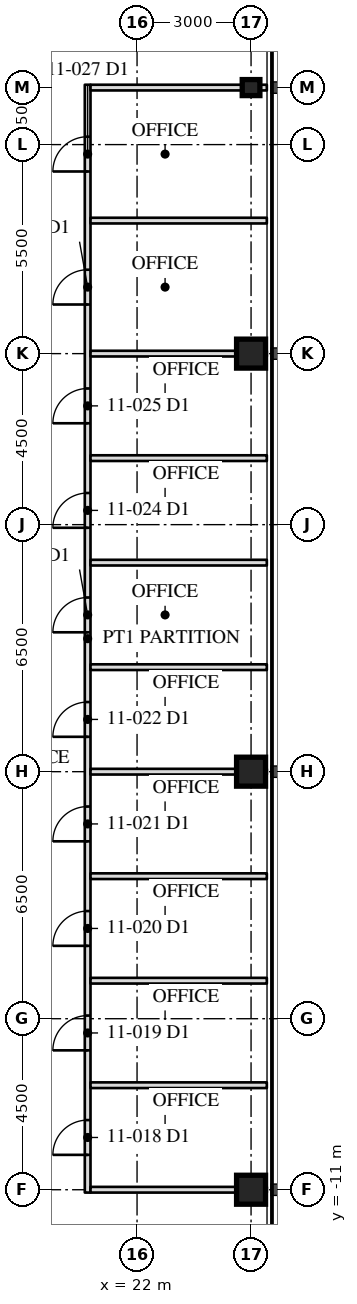
"""IFC4 building model, lengths in metres.
Left out: names, types, materials, properties, quantities, classifications, styles, units other than length and angle.
Written with IfcOpenShell. Run it as: python <this file> out.ifc"""

import sys

from ifc_helpers import new_model, si_unit, direction, frame, frame_2d, origin, origin_2d, place, context, subcontext, project, spatial, rectangle, hollow_rectangle, i_section, extrude, element, fill, save


model = new_model("IFC4")
c1 = context("Model", 3, precision=1e-05, world=origin(), true_north=direction((0.0, 1.0)))
c2 = subcontext(c1, "Body", "Model", "MODEL_VIEW")
j1 = project(units=[si_unit("LENGTHUNIT", "METRE"), si_unit("PLANEANGLEUNIT", "RADIAN")], contexts=[c1])
p1 = place(None, origin())
s1 = spatial("IfcSite", under=j1, at=p1, CompositionType="ELEMENT")
p2 = place(p1, origin())
s2 = spatial("IfcBuilding", under=s1, at=p2, CompositionType="ELEMENT")
p3 = place(p2, frame((0.0, 0.0, 48.8)))
s3 = spatial("IfcBuildingStorey", under=s2, at=p3, CompositionType="ELEMENT", Elevation=48.8)
for number, where, z_axis, x_axis in (
    (1, (25.0, -11.0, 0.0), (0.0, 0.0, 1.0), (0.0, 1.0, 0.0)),
    (2, (25.0, 0.0, 0.0), (0.0, 0.0, 1.0), (0.0, 1.0, 0.0)),
    (3, (25.0, 11.0, 0.0), (0.0, 0.0, 1.0), (0.0, 1.0, 0.0)),
):
    element("IfcColumn", number, at=place(p3, frame(where, z_axis=z_axis, x_axis=x_axis)), inside=s3, PredefinedType="COLUMN", context=c2, shape_type="SweptSolid", body=[
        extrude(hollow_rectangle(XDim=0.762, YDim=0.762, WallThickness=0.127, at=origin_2d()), origin(), (0.0, 0.0, 1.0), 4.1),
    ])
p4 = place(p3, frame((25.0, 18.0, 0.0), z_axis=(0.0, 0.0, 1.0), x_axis=(0.0, 1.0, 0.0)))
e4 = element("IfcColumn", 4, at=p4, inside=s3, PredefinedType="COLUMN", context=c2, shape_type="SweptSolid", body=[
    extrude(i_section(OverallWidth=0.422, OverallDepth=0.465, WebThickness=0.045, FlangeThickness=0.073, at=origin_2d()), origin(), (0.0, 0.0, 1.0), 4.1),
])
p5 = place(p3, frame((20.7, -11.075, 0.0), z_axis=(0.0, 0.0, 1.0), x_axis=(0.0, 1.0, 0.0)))
e5 = element("IfcWall", 5, at=p5, inside=s3, PredefinedType="PARTITIONING", context=c2, shape_type="SweptSolid", body=[
    extrude(rectangle(XDim=29.15, YDim=0.15, at=frame_2d((14.575, 0.0))), origin(), (0.0, 0.0, 1.0), 3.91),
])
p6 = place(p5, frame((0.992, 0.0, 0.0)))
e6 = element("IfcOpeningElement", 6, at=p6, cuts=e5, PredefinedType="OPENING", context=c2, shape_type="SweptSolid", body=[
    extrude(rectangle(XDim=0.915, YDim=2.134, at=frame_2d((0.458, 1.067))), frame((0.0, 0.085, 0.0), z_axis=(0.0, -1.0, 0.0), x_axis=(1.0, 0.0, 0.0)), (0.0, 0.0, 1.0), 0.17),
])
p7 = place(p5, frame((3.742, 0.0, 0.0)))
e7 = element("IfcOpeningElement", 7, at=p7, cuts=e5, PredefinedType="OPENING", context=c2, shape_type="SweptSolid", body=[
    extrude(rectangle(XDim=0.915, YDim=2.134, at=frame_2d((0.458, 1.067))), frame((0.0, 0.085, 0.0), z_axis=(0.0, -1.0, 0.0), x_axis=(1.0, 0.0, 0.0)), (0.0, 0.0, 1.0), 0.17),
])
p8 = place(p5, frame((6.492, 0.0, 0.0)))
e8 = element("IfcOpeningElement", 8, at=p8, cuts=e5, PredefinedType="OPENING", context=c2, shape_type="SweptSolid", body=[
    extrude(rectangle(XDim=0.915, YDim=2.134, at=frame_2d((0.458, 1.067))), frame((0.0, 0.085, 0.0), z_axis=(0.0, -1.0, 0.0), x_axis=(1.0, 0.0, 0.0)), (0.0, 0.0, 1.0), 0.17),
])
p9 = place(p5, frame((9.242, 0.0, 0.0)))
e9 = element("IfcOpeningElement", 9, at=p9, cuts=e5, PredefinedType="OPENING", context=c2, shape_type="SweptSolid", body=[
    extrude(rectangle(XDim=0.915, YDim=2.134, at=frame_2d((0.458, 1.067))), frame((0.0, 0.085, 0.0), z_axis=(0.0, -1.0, 0.0), x_axis=(1.0, 0.0, 0.0)), (0.0, 0.0, 1.0), 0.17),
])
p10 = place(p5, frame((11.992, 0.0, 0.0)))
e10 = element("IfcOpeningElement", 10, at=p10, cuts=e5, PredefinedType="OPENING", context=c2, shape_type="SweptSolid", body=[
    extrude(rectangle(XDim=0.915, YDim=2.134, at=frame_2d((0.458, 1.067))), frame((0.0, 0.085, 0.0), z_axis=(0.0, -1.0, 0.0), x_axis=(1.0, 0.0, 0.0)), (0.0, 0.0, 1.0), 0.17),
])
p11 = place(p5, frame((14.742, 0.0, 0.0)))
e11 = element("IfcOpeningElement", 11, at=p11, cuts=e5, PredefinedType="OPENING", context=c2, shape_type="SweptSolid", body=[
    extrude(rectangle(XDim=0.915, YDim=2.134, at=frame_2d((0.458, 1.067))), frame((0.0, 0.085, 0.0), z_axis=(0.0, -1.0, 0.0), x_axis=(1.0, 0.0, 0.0)), (0.0, 0.0, 1.0), 0.17),
])
p12 = place(p5, frame((17.492, 0.0, 0.0)))
e12 = element("IfcOpeningElement", 12, at=p12, cuts=e5, PredefinedType="OPENING", context=c2, shape_type="SweptSolid", body=[
    extrude(rectangle(XDim=0.915, YDim=2.134, at=frame_2d((0.458, 1.067))), frame((0.0, 0.085, 0.0), z_axis=(0.0, -1.0, 0.0), x_axis=(1.0, 0.0, 0.0)), (0.0, 0.0, 1.0), 0.17),
])
p13 = place(p5, frame((20.242, 0.0, 0.0)))
e13 = element("IfcOpeningElement", 13, at=p13, cuts=e5, PredefinedType="OPENING", context=c2, shape_type="SweptSolid", body=[
    extrude(rectangle(XDim=0.915, YDim=2.134, at=frame_2d((0.458, 1.067))), frame((0.0, 0.085, 0.0), z_axis=(0.0, -1.0, 0.0), x_axis=(1.0, 0.0, 0.0)), (0.0, 0.0, 1.0), 0.17),
])
p14 = place(p5, frame((23.367, 0.0, 0.0)))
e14 = element("IfcOpeningElement", 14, at=p14, cuts=e5, PredefinedType="OPENING", context=c2, shape_type="SweptSolid", body=[
    extrude(rectangle(XDim=0.915, YDim=2.134, at=frame_2d((0.458, 1.067))), frame((0.0, 0.085, 0.0), z_axis=(0.0, -1.0, 0.0), x_axis=(1.0, 0.0, 0.0)), (0.0, 0.0, 1.0), 0.17),
])
p15 = place(p5, frame((26.867, 0.0, 0.0)))
e15 = element("IfcOpeningElement", 15, at=p15, cuts=e5, PredefinedType="OPENING", context=c2, shape_type="SweptSolid", body=[
    extrude(rectangle(XDim=0.915, YDim=2.134, at=frame_2d((0.458, 1.067))), frame((0.0, 0.085, 0.0), z_axis=(0.0, -1.0, 0.0), x_axis=(1.0, 0.0, 0.0)), (0.0, 0.0, 1.0), 0.17),
])
p16 = place(p3, frame((20.775, -11.0, 0.0), z_axis=(0.0, 0.0, 1.0), x_axis=(1.0, 0.0, 0.0)))
e16 = element("IfcWall", 16, at=p16, inside=s3, PredefinedType="PARTITIONING", context=c2, shape_type="SweptSolid", body=[
    extrude(rectangle(XDim=4.64, YDim=0.15, at=frame_2d((2.32, 0.0))), origin(), (0.0, 0.0, 1.0), 3.13),
])
for number, where, z_axis, x_axis in (
    (17, (20.775, -8.25, 0.0), (0.0, 0.0, 1.0), (1.0, 0.0, 0.0)),
    (18, (20.775, -5.5, 0.0), (0.0, 0.0, 1.0), (1.0, 0.0, 0.0)),
    (19, (20.775, -2.75, 0.0), (0.0, 0.0, 1.0), (1.0, 0.0, 0.0)),
):
    element("IfcWall", number, at=place(p3, frame(where, z_axis=z_axis, x_axis=x_axis)), inside=s3, PredefinedType="PARTITIONING", context=c2, shape_type="SweptSolid", body=[
        extrude(rectangle(XDim=4.64, YDim=0.15, at=frame_2d((2.32, 0.0))), origin(), (0.0, 0.0, 1.0), 3.91),
    ])
p17 = place(p3, frame((20.775, 0.0, 0.0), z_axis=(0.0, 0.0, 1.0), x_axis=(1.0, 0.0, 0.0)))
e20 = element("IfcWall", 20, at=p17, inside=s3, PredefinedType="PARTITIONING", context=c2, shape_type="SweptSolid", body=[
    extrude(rectangle(XDim=4.64, YDim=0.15, at=frame_2d((2.32, 0.0))), origin(), (0.0, 0.0, 1.0), 3.13),
])
for number, where, z_axis, x_axis in (
    (21, (20.775, 2.75, 0.0), (0.0, 0.0, 1.0), (1.0, 0.0, 0.0)),
    (22, (20.775, 5.5, 0.0), (0.0, 0.0, 1.0), (1.0, 0.0, 0.0)),
    (23, (20.775, 8.25, 0.0), (0.0, 0.0, 1.0), (1.0, 0.0, 0.0)),
):
    element("IfcWall", number, at=place(p3, frame(where, z_axis=z_axis, x_axis=x_axis)), inside=s3, PredefinedType="PARTITIONING", context=c2, shape_type="SweptSolid", body=[
        extrude(rectangle(XDim=4.64, YDim=0.15, at=frame_2d((2.32, 0.0))), origin(), (0.0, 0.0, 1.0), 3.91),
    ])
p18 = place(p3, frame((20.775, 11.0, 0.0), z_axis=(0.0, 0.0, 1.0), x_axis=(1.0, 0.0, 0.0)))
e24 = element("IfcWall", 24, at=p18, inside=s3, PredefinedType="PARTITIONING", context=c2, shape_type="SweptSolid", body=[
    extrude(rectangle(XDim=4.64, YDim=0.15, at=frame_2d((2.32, 0.0))), origin(), (0.0, 0.0, 1.0), 3.13),
])
for number, where, z_axis, x_axis in (
    (25, (20.775, 14.5, 0.0), (0.0, 0.0, 1.0), (1.0, 0.0, 0.0)),
    (26, (20.775, 18.0, 0.0), (0.0, 0.0, 1.0), (1.0, 0.0, 0.0)),
):
    element("IfcWall", number, at=place(p3, frame(where, z_axis=z_axis, x_axis=x_axis)), inside=s3, PredefinedType="PARTITIONING", context=c2, shape_type="SweptSolid", body=[
        extrude(rectangle(XDim=4.64, YDim=0.15, at=frame_2d((2.32, 0.0))), origin(), (0.0, 0.0, 1.0), 3.91),
    ])
p19 = place(p6, origin())
e27 = element("IfcDoor", 27, at=p19, inside=s3, OperationType="SINGLE_SWING_LEFT", PredefinedType="DOOR", context=c2, shape_type="SweptSolid", body=[
    extrude(rectangle(XDim=0.915, YDim=2.134, at=frame_2d((0.458, 1.067))), frame((0.0, 0.025, 0.0), z_axis=(0.0, -1.0, 0.0), x_axis=(1.0, 0.0, 0.0)), (0.0, 0.0, 1.0), 0.05),
])
fill(e6, e27)
p20 = place(p7, origin())
e28 = element("IfcDoor", 28, at=p20, inside=s3, OperationType="SINGLE_SWING_LEFT", PredefinedType="DOOR", context=c2, shape_type="SweptSolid", body=[
    extrude(rectangle(XDim=0.915, YDim=2.134, at=frame_2d((0.458, 1.067))), frame((0.0, 0.025, 0.0), z_axis=(0.0, -1.0, 0.0), x_axis=(1.0, 0.0, 0.0)), (0.0, 0.0, 1.0), 0.05),
])
fill(e7, e28)
p21 = place(p8, origin())
e29 = element("IfcDoor", 29, at=p21, inside=s3, OperationType="SINGLE_SWING_LEFT", PredefinedType="DOOR", context=c2, shape_type="SweptSolid", body=[
    extrude(rectangle(XDim=0.915, YDim=2.134, at=frame_2d((0.458, 1.067))), frame((0.0, 0.025, 0.0), z_axis=(0.0, -1.0, 0.0), x_axis=(1.0, 0.0, 0.0)), (0.0, 0.0, 1.0), 0.05),
])
fill(e8, e29)
p22 = place(p9, origin())
e30 = element("IfcDoor", 30, at=p22, inside=s3, OperationType="SINGLE_SWING_LEFT", PredefinedType="DOOR", context=c2, shape_type="SweptSolid", body=[
    extrude(rectangle(XDim=0.915, YDim=2.134, at=frame_2d((0.458, 1.067))), frame((0.0, 0.025, 0.0), z_axis=(0.0, -1.0, 0.0), x_axis=(1.0, 0.0, 0.0)), (0.0, 0.0, 1.0), 0.05),
])
fill(e9, e30)
p23 = place(p10, origin())
e31 = element("IfcDoor", 31, at=p23, inside=s3, OperationType="SINGLE_SWING_LEFT", PredefinedType="DOOR", context=c2, shape_type="SweptSolid", body=[
    extrude(rectangle(XDim=0.915, YDim=2.134, at=frame_2d((0.458, 1.067))), frame((0.0, 0.025, 0.0), z_axis=(0.0, -1.0, 0.0), x_axis=(1.0, 0.0, 0.0)), (0.0, 0.0, 1.0), 0.05),
])
fill(e10, e31)
p24 = place(p11, origin())
e32 = element("IfcDoor", 32, at=p24, inside=s3, OperationType="SINGLE_SWING_LEFT", PredefinedType="DOOR", context=c2, shape_type="SweptSolid", body=[
    extrude(rectangle(XDim=0.915, YDim=2.134, at=frame_2d((0.458, 1.067))), frame((0.0, 0.025, 0.0), z_axis=(0.0, -1.0, 0.0), x_axis=(1.0, 0.0, 0.0)), (0.0, 0.0, 1.0), 0.05),
])
fill(e11, e32)
p25 = place(p12, origin())
e33 = element("IfcDoor", 33, at=p25, inside=s3, OperationType="SINGLE_SWING_LEFT", PredefinedType="DOOR", context=c2, shape_type="SweptSolid", body=[
    extrude(rectangle(XDim=0.915, YDim=2.134, at=frame_2d((0.458, 1.067))), frame((0.0, 0.025, 0.0), z_axis=(0.0, -1.0, 0.0), x_axis=(1.0, 0.0, 0.0)), (0.0, 0.0, 1.0), 0.05),
])
fill(e12, e33)
p26 = place(p13, origin())
e34 = element("IfcDoor", 34, at=p26, inside=s3, OperationType="SINGLE_SWING_LEFT", PredefinedType="DOOR", context=c2, shape_type="SweptSolid", body=[
    extrude(rectangle(XDim=0.915, YDim=2.134, at=frame_2d((0.458, 1.067))), frame((0.0, 0.025, 0.0), z_axis=(0.0, -1.0, 0.0), x_axis=(1.0, 0.0, 0.0)), (0.0, 0.0, 1.0), 0.05),
])
fill(e13, e34)
p27 = place(p14, origin())
e35 = element("IfcDoor", 35, at=p27, inside=s3, OperationType="SINGLE_SWING_LEFT", PredefinedType="DOOR", context=c2, shape_type="SweptSolid", body=[
    extrude(rectangle(XDim=0.915, YDim=2.134, at=frame_2d((0.458, 1.067))), frame((0.0, 0.025, 0.0), z_axis=(0.0, -1.0, 0.0), x_axis=(1.0, 0.0, 0.0)), (0.0, 0.0, 1.0), 0.05),
])
fill(e14, e35)
p28 = place(p15, origin())
e36 = element("IfcDoor", 36, at=p28, inside=s3, OperationType="SINGLE_SWING_LEFT", PredefinedType="DOOR", context=c2, shape_type="SweptSolid", body=[
    extrude(rectangle(XDim=0.915, YDim=2.134, at=frame_2d((0.458, 1.067))), frame((0.0, 0.025, 0.0), z_axis=(0.0, -1.0, 0.0), x_axis=(1.0, 0.0, 0.0)), (0.0, 0.0, 1.0), 0.05),
])
fill(e15, e36)
save(model, sys.argv[1])
